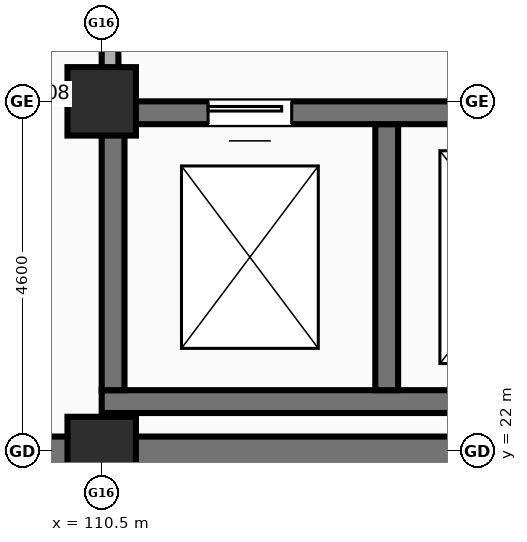
"""IFC4 building model, lengths in metres.
Left out: names, types, materials, properties, quantities, classifications, styles, units other than length and angle.
Written with IfcOpenShell. Run it as: python <this file> out.ifc"""

import sys

from ifc_helpers import new_model, si_unit, direction, frame, frame_2d, origin, origin_2d, place, context, subcontext, project, spatial, rectangle, extrude, element, fill, save


model = new_model("IFC4")
c1 = context("Model", 3, precision=1e-05, world=origin(), true_north=direction((0.0, 1.0)))
c2 = subcontext(c1, "Body", "Model", "MODEL_VIEW")
j1 = project(units=[si_unit("LENGTHUNIT", "METRE"), si_unit("PLANEANGLEUNIT", "RADIAN")], contexts=[c1])
p1 = place(None, origin())
s1 = spatial("IfcSite", under=j1, at=p1, CompositionType="ELEMENT")
p2 = place(p1, origin())
s2 = spatial("IfcBuilding", under=s1, at=p2, CompositionType="ELEMENT")
p3 = place(p2, frame((0.0, 0.0, -4.2)))
s3 = spatial("IfcBuildingStorey", under=s2, at=p3, CompositionType="ELEMENT", Elevation=-4.2)
for number, where, z_axis, x_axis in (
    (1, (110.5, 22.0, -0.42), (0.0, 0.0, 1.0), (1.0, 0.0, 0.0)),
    (2, (110.5, 26.6, -0.42), (0.0, 0.0, 1.0), (1.0, 0.0, 0.0)),
):
    element("IfcColumn", number, at=place(p3, frame(where, z_axis=z_axis, x_axis=x_axis)), inside=s3, PredefinedType="COLUMN", context=c2, shape_type="SweptSolid", body=[
        extrude(rectangle(XDim=0.9, YDim=0.9, at=origin_2d()), origin(), (0.0, 0.0, 1.0), 4.62),
    ])
p4 = place(p3, frame((110.5, 22.65, -0.42), z_axis=(0.0, 0.0, 1.0), x_axis=(1.0, 0.0, 0.0)))
e3 = element("IfcWall", 3, at=p4, inside=s3, PredefinedType="SHEAR", context=c2, shape_type="SweptSolid", body=[
    extrude(rectangle(XDim=7.5, YDim=0.3, at=frame_2d((3.75, 0.0))), origin(), (0.0, 0.0, 1.0), 4.62),
])
for number, where, z_axis, x_axis in (
    (4, (110.65, 22.8, -0.42), (0.0, 0.0, 1.0), (0.0, 1.0, 0.0)),
    (5, (114.25, 22.8, -0.42), (0.0, 0.0, 1.0), (0.0, 1.0, 0.0)),
):
    element("IfcWall", number, at=place(p3, frame(where, z_axis=z_axis, x_axis=x_axis)), inside=s3, PredefinedType="SHEAR", context=c2, shape_type="SweptSolid", body=[
        extrude(rectangle(XDim=3.5, YDim=0.3, at=frame_2d((1.75, 0.0))), origin(), (0.0, 0.0, 1.0), 4.62),
    ])
p5 = place(p3, frame((110.5, 26.45, 0.0), z_axis=(0.0, 0.0, 1.0), x_axis=(1.0, 0.0, 0.0)))
e6 = element("IfcWall", 6, at=p5, inside=s3, PredefinedType="SHEAR", context=c2, shape_type="SweptSolid", body=[
    extrude(rectangle(XDim=7.5, YDim=0.3, at=frame_2d((3.75, 0.0))), origin(), (0.0, 0.0, 1.0), 4.2),
])
p6 = place(p5, frame((1.4, 0.0, 0.0)))
e7 = element("IfcOpeningElement", 7, at=p6, cuts=e6, PredefinedType="OPENING", context=c2, shape_type="SweptSolid", body=[
    extrude(rectangle(XDim=1.1, YDim=2.15, at=frame_2d((0.55, 1.075))), frame((0.0, 0.16, 0.0), z_axis=(0.0, -1.0, 0.0), x_axis=(1.0, 0.0, 0.0)), (0.0, 0.0, 1.0), 0.32),
])
p7 = place(p5, frame((5.0, 0.0, 0.0)))
e8 = element("IfcOpeningElement", 8, at=p7, cuts=e6, PredefinedType="OPENING", context=c2, shape_type="SweptSolid", body=[
    extrude(rectangle(XDim=1.6, YDim=2.25, at=frame_2d((0.8, 1.125))), frame((0.0, 0.16, 0.0), z_axis=(0.0, -1.0, 0.0), x_axis=(1.0, 0.0, 0.0)), (0.0, 0.0, 1.0), 0.32),
])
p8 = place(p3, frame((110.61, 26.75, 0.0), z_axis=(0.0, 0.0, 1.0), x_axis=(0.0, 1.0, 0.0)))
e9 = element("IfcWall", 9, at=p8, inside=s3, PredefinedType="SOLIDWALL", context=c2, shape_type="SweptSolid", body=[
    extrude(rectangle(XDim=3.83, YDim=0.22, at=frame_2d((1.915, 0.0))), origin(), (0.0, 0.0, 1.0), 2.96),
])
p9 = place(p3, frame((55.92, 22.0, -0.42), z_axis=(0.0, 0.0, 1.0), x_axis=(1.0, 0.0, 0.0)))
e10 = element("IfcWall", 10, at=p9, inside=s3, PredefinedType="SHEAR", context=c2, shape_type="SweptSolid", body=[
    extrude(rectangle(XDim=64.16, YDim=0.38, at=frame_2d((32.08, 0.0))), origin(), (0.0, 0.0, 1.0), 4.3),
])
p10 = place(p6, origin())
e11 = element("IfcDoor", 11, at=p10, inside=s3, OperationType="SLIDING_TO_LEFT", PredefinedType="DOOR", context=c2, shape_type="SweptSolid", body=[
    extrude(rectangle(XDim=1.1, YDim=2.15, at=frame_2d((0.55, 1.075))), frame((0.0, 0.025, 0.0), z_axis=(0.0, -1.0, 0.0), x_axis=(1.0, 0.0, 0.0)), (0.0, 0.0, 1.0), 0.05),
])
fill(e7, e11)
save(model, sys.argv[1])
